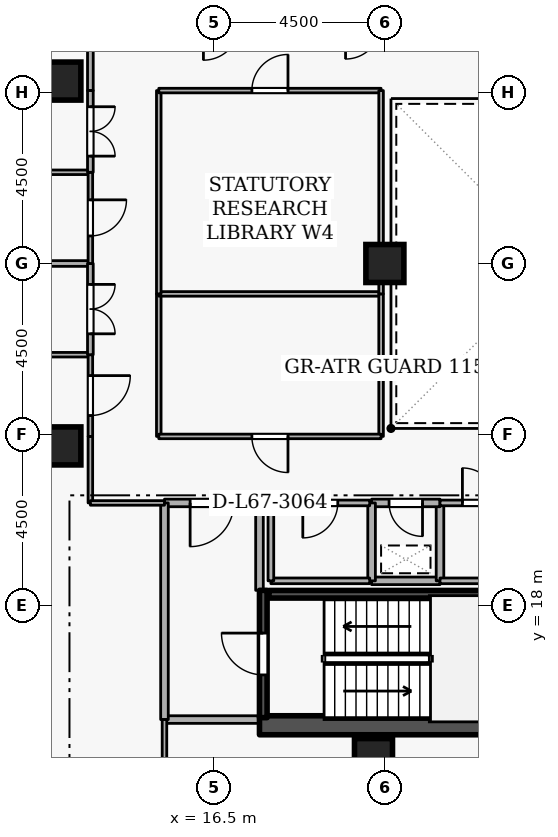
"""IFC4 building model, lengths in metres.
Left out: names, types, materials, properties, quantities, classifications, styles, units other than length and angle.
Written with IfcOpenShell. Run it as: python <this file> out.ifc"""

import sys

from ifc_helpers import new_model, si_unit, direction, frame, frame_2d, origin, origin_2d, place, context, subcontext, project, spatial, rectangle, extrude, element, fill, save


model = new_model("IFC4")
c1 = context("Model", 3, precision=1e-05, world=origin(), true_north=direction((0.0, 1.0)))
c2 = subcontext(c1, "Body", "Model", "MODEL_VIEW")
j1 = project(units=[si_unit("LENGTHUNIT", "METRE"), si_unit("PLANEANGLEUNIT", "RADIAN")], contexts=[c1])
p1 = place(None, origin())
s1 = spatial("IfcSite", under=j1, at=p1, CompositionType="ELEMENT")
p2 = place(p1, origin())
s2 = spatial("IfcBuilding", under=s1, at=p2, CompositionType="ELEMENT")
p3 = place(p2, frame((0.0, 0.0, 251.1)))
s3 = spatial("IfcBuildingStorey", under=s2, at=p3, CompositionType="ELEMENT", Elevation=251.1)
p4 = place(p3, frame((17.7, 14.85, 0.0), z_axis=(0.0, 0.0, 1.0), x_axis=(1.0, 0.0, 0.0)))
e1 = element("IfcWall", 1, at=p4, inside=s3, PredefinedType="SHEAR", context=c2, shape_type="SweptSolid", body=[
    extrude(rectangle(XDim=15.6, YDim=0.5, at=frame_2d((7.8, 0.0))), origin(), (0.0, 0.0, 1.0), 3.6),
])
for number, where, z_axis, x_axis in (
    (2, (12.5, 22.2, 0.0), (0.0, 0.0, 1.0), (1.0, 0.0, 0.0)),
    (3, (12.5, 31.8, 0.0), (0.0, 0.0, 1.0), (1.0, 0.0, 0.0)),
    (4, (20.7, 14.0, 0.0), (0.0, 0.0, 1.0), (1.0, 0.0, 0.0)),
    (5, (21.0, 27.0, 0.0), (0.0, 0.0, 1.0), (1.0, 0.0, 0.0)),
):
    element("IfcColumn", number, at=place(p3, frame(where, z_axis=z_axis, x_axis=x_axis)), inside=s3, PredefinedType="COLUMN", context=c2, shape_type="SweptSolid", body=[
        extrude(rectangle(XDim=1.0, YDim=1.0, at=origin_2d()), origin(), (0.0, 0.0, 1.0), 3.6),
    ])
p5 = place(p3, frame((17.8, 15.05, 0.0), z_axis=(0.0, 0.0, 1.0), x_axis=(0.0, 1.0, 0.0)))
e6 = element("IfcWall", 6, at=p5, inside=s3, PredefinedType="SHEAR", context=c2, shape_type="SweptSolid", body=[
    extrude(rectangle(XDim=3.35, YDim=0.2, at=frame_2d((1.675, 0.0))), origin(), (0.0, 0.0, 1.0), 3.6),
])
p6 = place(p5, frame((1.125, 0.0, 0.0)))
e7 = element("IfcOpeningElement", 7, at=p6, cuts=e6, PredefinedType="OPENING", context=c2, shape_type="SweptSolid", body=[
    extrude(rectangle(XDim=1.1, YDim=2.1, at=frame_2d((0.55, 1.05))), frame((0.0, 0.11, 0.0), z_axis=(0.0, -1.0, 0.0), x_axis=(1.0, 0.0, 0.0)), (0.0, 0.0, 1.0), 0.22),
])
p7 = place(p3, frame((25.05, 18.297, 0.0), z_axis=(0.0, 0.0, 1.0), x_axis=(-1.0, 0.0, 0.0)))
e8 = element("IfcWall", 8, at=p7, inside=s3, PredefinedType="SHEAR", context=c2, shape_type="SweptSolid", body=[
    extrude(rectangle(XDim=7.1, YDim=0.2, at=frame_2d((3.55, 0.0))), origin(), (0.0, 0.0, 1.0), 3.6),
])
p8 = place(p3, frame((15.2, 15.0, 0.0), z_axis=(0.0, 0.0, 1.0), x_axis=(1.0, 0.0, 0.0)))
e9 = element("IfcWall", 9, at=p8, inside=s3, PredefinedType="STANDARD", context=c2, shape_type="SweptSolid", body=[
    extrude(rectangle(XDim=2.5, YDim=0.2, at=frame_2d((1.25, 0.0))), origin(), (0.0, 0.0, 1.0), 3.32),
])
p9 = place(p3, frame((17.7, 18.4, 0.0), z_axis=(0.0, 0.0, 1.0), x_axis=(0.0, 1.0, 0.0)))
e10 = element("IfcWall", 10, at=p9, inside=s3, PredefinedType="STANDARD", context=c2, shape_type="SweptSolid", body=[
    extrude(rectangle(XDim=2.3, YDim=0.2, at=frame_2d((1.15, 0.0))), origin(), (0.0, 0.0, 1.0), 2.525),
])
p10 = place(p3, frame((17.7, 20.7, 0.0), z_axis=(0.0, 0.0, 1.0), x_axis=(-1.0, 0.0, 0.0)))
e11 = element("IfcWall", 11, at=p10, inside=s3, PredefinedType="STANDARD", context=c2, shape_type="SweptSolid", body=[
    extrude(rectangle(XDim=2.5, YDim=0.2, at=frame_2d((1.25, 0.0))), origin(), (0.0, 0.0, 1.0), 3.32),
])
p11 = place(p10, frame((0.675, 0.0, 0.0)))
e12 = element("IfcOpeningElement", 12, at=p11, cuts=e11, PredefinedType="OPENING", context=c2, shape_type="SweptSolid", body=[
    extrude(rectangle(XDim=1.15, YDim=2.1, at=frame_2d((0.575, 1.05))), frame((0.0, 0.11, 0.0), z_axis=(0.0, -1.0, 0.0), x_axis=(1.0, 0.0, 0.0)), (0.0, 0.0, 1.0), 0.22),
])
p12 = place(p3, frame((15.2, 20.7, 0.0), z_axis=(0.0, 0.0, 1.0), x_axis=(0.0, -1.0, 0.0)))
e13 = element("IfcWall", 13, at=p12, inside=s3, PredefinedType="STANDARD", context=c2, shape_type="SweptSolid", body=[
    extrude(rectangle(XDim=5.7, YDim=0.2, at=frame_2d((2.85, 0.0))), origin(), (0.0, 0.0, 1.0), 3.32),
])
p13 = place(p3, frame((20.65, 18.65, 0.0), z_axis=(0.0, 0.0, 1.0), x_axis=(1.0, 0.0, 0.0)))
e14 = element("IfcWall", 14, at=p13, inside=s3, PredefinedType="STANDARD", context=c2, shape_type="SweptSolid", body=[
    extrude(rectangle(XDim=1.8, YDim=0.2, at=frame_2d((0.9, 0.0))), origin(), (0.0, 0.0, 1.0), 3.32),
])
p14 = place(p3, frame((22.45, 18.65, 0.0), z_axis=(0.0, 0.0, 1.0), x_axis=(0.0, 1.0, 0.0)))
e15 = element("IfcWall", 15, at=p14, inside=s3, PredefinedType="STANDARD", context=c2, shape_type="SweptSolid", body=[
    extrude(rectangle(XDim=2.05, YDim=0.2, at=frame_2d((1.025, 0.0))), origin(), (0.0, 0.0, 1.0), 3.32),
])
p15 = place(p3, frame((22.45, 20.7, 0.0), z_axis=(0.0, 0.0, 1.0), x_axis=(-1.0, 0.0, 0.0)))
e16 = element("IfcWall", 16, at=p15, inside=s3, PredefinedType="STANDARD", context=c2, shape_type="SweptSolid", body=[
    extrude(rectangle(XDim=1.8, YDim=0.2, at=frame_2d((0.9, 0.0))), origin(), (0.0, 0.0, 1.0), 3.32),
])
p16 = place(p15, frame((0.46, 0.0, 0.0)))
e17 = element("IfcOpeningElement", 17, at=p16, cuts=e16, PredefinedType="OPENING", context=c2, shape_type="SweptSolid", body=[
    extrude(rectangle(XDim=0.88, YDim=2.04, at=frame_2d((0.44, 1.02))), frame((0.0, 0.11, 0.0), z_axis=(0.0, -1.0, 0.0), x_axis=(1.0, 0.0, 0.0)), (0.0, 0.0, 1.0), 0.22),
])
p17 = place(p3, frame((20.65, 20.7, 0.0), z_axis=(0.0, 0.0, 1.0), x_axis=(0.0, -1.0, 0.0)))
e18 = element("IfcWall", 18, at=p17, inside=s3, PredefinedType="STANDARD", context=c2, shape_type="SweptSolid", body=[
    extrude(rectangle(XDim=2.05, YDim=0.2, at=frame_2d((1.025, 0.0))), origin(), (0.0, 0.0, 1.0), 3.32),
])
p18 = place(p3, frame((18.0, 18.65, 0.0), z_axis=(0.0, 0.0, 1.0), x_axis=(1.0, 0.0, 0.0)))
e19 = element("IfcWall", 19, at=p18, inside=s3, PredefinedType="PARTITIONING", context=c2, shape_type="SweptSolid", body=[
    extrude(rectangle(XDim=2.6, YDim=0.15, at=frame_2d((1.3, 0.0))), origin(), (0.0, 0.0, 1.0), 3.32),
])
p19 = place(p3, frame((20.6, 20.7, 0.0), z_axis=(0.0, 0.0, 1.0), x_axis=(-1.0, 0.0, 0.0)))
e20 = element("IfcWall", 20, at=p19, inside=s3, PredefinedType="PARTITIONING", context=c2, shape_type="SweptSolid", body=[
    extrude(rectangle(XDim=2.6, YDim=0.15, at=frame_2d((1.3, 0.0))), origin(), (0.0, 0.0, 1.0), 3.32),
])
p20 = place(p19, frame((0.84, 0.0, 0.0)))
e21 = element("IfcOpeningElement", 21, at=p20, cuts=e20, PredefinedType="OPENING", context=c2, shape_type="SweptSolid", body=[
    extrude(rectangle(XDim=0.92, YDim=2.08, at=frame_2d((0.46, 1.04))), frame((0.0, 0.085, 0.0), z_axis=(0.0, -1.0, 0.0), x_axis=(1.0, 0.0, 0.0)), (0.0, 0.0, 1.0), 0.17),
])
p21 = place(p3, frame((18.0, 20.7, 0.0), z_axis=(0.0, 0.0, 1.0), x_axis=(0.0, -1.0, 0.0)))
e22 = element("IfcWall", 22, at=p21, inside=s3, PredefinedType="PARTITIONING", context=c2, shape_type="SweptSolid", body=[
    extrude(rectangle(XDim=2.05, YDim=0.15, at=frame_2d((1.025, 0.0))), origin(), (0.0, 0.0, 1.0), 2.525),
])
p22 = place(p3, frame((24.55, 18.65, 0.0), z_axis=(0.0, 0.0, 1.0), x_axis=(-1.0, 0.0, 0.0)))
e23 = element("IfcWall", 23, at=p22, inside=s3, PredefinedType="PARTITIONING", context=c2, shape_type="SweptSolid", body=[
    extrude(rectangle(XDim=2.1, YDim=0.15, at=frame_2d((1.05, 0.0))), origin(), (0.0, 0.0, 1.0), 3.32),
])
p23 = place(p3, frame((22.45, 20.7, 0.0), z_axis=(0.0, 0.0, 1.0), x_axis=(1.0, 0.0, 0.0)))
e24 = element("IfcWall", 24, at=p23, inside=s3, PredefinedType="PARTITIONING", context=c2, shape_type="SweptSolid", body=[
    extrude(rectangle(XDim=2.1, YDim=0.15, at=frame_2d((1.05, 0.0))), origin(), (0.0, 0.0, 1.0), 3.32),
])
p24 = place(p23, frame((0.59, 0.0, 0.0)))
e25 = element("IfcOpeningElement", 25, at=p24, cuts=e24, PredefinedType="OPENING", context=c2, shape_type="SweptSolid", body=[
    extrude(rectangle(XDim=0.92, YDim=2.08, at=frame_2d((0.46, 1.04))), frame((0.0, 0.085, 0.0), z_axis=(0.0, -1.0, 0.0), x_axis=(1.0, 0.0, 0.0)), (0.0, 0.0, 1.0), 0.17),
])
p25 = place(p3, frame((13.25, 22.45, 0.0), z_axis=(0.0, 0.0, 1.0), x_axis=(0.0, -1.0, 0.0)))
e26 = element("IfcWall", 26, at=p25, inside=s3, PredefinedType="PARTITIONING", context=c2, shape_type="SweptSolid", body=[
    extrude(rectangle(XDim=1.75, YDim=0.12, at=frame_2d((0.875, 0.0))), origin(), (0.0, 0.0, 1.0), 3.32),
])
p26 = place(p3, frame((13.25, 20.7, 0.0), z_axis=(0.0, 0.0, 1.0), x_axis=(1.0, 0.0, 0.0)))
e27 = element("IfcWall", 27, at=p26, inside=s3, PredefinedType="PARTITIONING", context=c2, shape_type="SweptSolid", body=[
    extrude(rectangle(XDim=1.95, YDim=0.12, at=frame_2d((0.975, 0.0))), origin(), (0.0, 0.0, 1.0), 3.32),
])
p27 = place(p3, frame((15.2, 15.0, 0.0), z_axis=(0.0, 0.0, 1.0), x_axis=(0.0, -1.0, 0.0)))
e28 = element("IfcWall", 28, at=p27, inside=s3, PredefinedType="PARTITIONING", context=c2, shape_type="SweptSolid", body=[
    extrude(rectangle(XDim=11.72, YDim=0.12, at=frame_2d((5.86, 0.0))), origin(), (0.0, 0.0, 1.0), 3.32),
])
p28 = place(p3, frame((1.78, 24.6, 0.0), z_axis=(0.0, 0.0, 1.0), x_axis=(1.0, 0.0, 0.0)))
e29 = element("IfcWall", 29, at=p28, inside=s3, PredefinedType="PARTITIONING", context=c2, shape_type="SweptSolid", body=[
    extrude(rectangle(XDim=11.47, YDim=0.12, at=frame_2d((5.735, 0.0))), origin(), (0.0, 0.0, 1.0), 3.32),
])
p29 = place(p3, frame((13.25, 24.6, 0.0), z_axis=(0.0, 0.0, 1.0), x_axis=(0.0, -1.0, 0.0)))
e30 = element("IfcWall", 30, at=p29, inside=s3, PredefinedType="PARTITIONING", context=c2, shape_type="SweptSolid", body=[
    extrude(rectangle(XDim=2.15, YDim=0.12, at=frame_2d((1.075, 0.0))), origin(), (0.0, 0.0, 1.0), 3.32),
])
p30 = place(p29, frame((0.55, 0.0, 0.0)))
e31 = element("IfcOpeningElement", 31, at=p30, cuts=e30, PredefinedType="OPENING", context=c2, shape_type="SweptSolid", body=[
    extrude(rectangle(XDim=1.05, YDim=2.1, at=frame_2d((0.525, 1.05))), frame((0.0, 0.07, 0.0), z_axis=(0.0, -1.0, 0.0), x_axis=(1.0, 0.0, 0.0)), (0.0, 0.0, 1.0), 0.14),
])
p31 = place(p3, frame((1.78, 27.0, 0.0), z_axis=(0.0, 0.0, 1.0), x_axis=(1.0, 0.0, 0.0)))
e32 = element("IfcWall", 32, at=p31, inside=s3, PredefinedType="PARTITIONING", context=c2, shape_type="SweptSolid", body=[
    extrude(rectangle(XDim=11.47, YDim=0.15, at=frame_2d((5.735, 0.0))), origin(), (0.0, 0.0, 1.0), 2.862),
])
p32 = place(p3, frame((13.25, 27.0, 0.0), z_axis=(0.0, 0.0, 1.0), x_axis=(0.0, -1.0, 0.0)))
e33 = element("IfcWall", 33, at=p32, inside=s3, PredefinedType="PARTITIONING", context=c2, shape_type="SweptSolid", body=[
    extrude(rectangle(XDim=2.4, YDim=0.15, at=frame_2d((1.2, 0.0))), origin(), (0.0, 0.0, 1.0), 3.32),
])
p33 = place(p32, frame((0.55, 0.0, 0.0)))
e34 = element("IfcOpeningElement", 34, at=p33, cuts=e33, PredefinedType="OPENING", context=c2, shape_type="SweptSolid", body=[
    extrude(rectangle(XDim=1.3, YDim=2.12, at=frame_2d((0.65, 1.06))), frame((0.0, 0.085, 0.0), z_axis=(0.0, -1.0, 0.0), x_axis=(1.0, 0.0, 0.0)), (0.0, 0.0, 1.0), 0.17),
])
p34 = place(p3, frame((1.78, 29.4, 0.0), z_axis=(0.0, 0.0, 1.0), x_axis=(1.0, 0.0, 0.0)))
e35 = element("IfcWall", 35, at=p34, inside=s3, PredefinedType="PARTITIONING", context=c2, shape_type="SweptSolid", body=[
    extrude(rectangle(XDim=11.47, YDim=0.12, at=frame_2d((5.735, 0.0))), origin(), (0.0, 0.0, 1.0), 3.32),
])
p35 = place(p3, frame((13.25, 29.4, 0.0), z_axis=(0.0, 0.0, 1.0), x_axis=(0.0, -1.0, 0.0)))
e36 = element("IfcWall", 36, at=p35, inside=s3, PredefinedType="PARTITIONING", context=c2, shape_type="SweptSolid", body=[
    extrude(rectangle(XDim=2.4, YDim=0.12, at=frame_2d((1.2, 0.0))), origin(), (0.0, 0.0, 1.0), 3.32),
])
p36 = place(p35, frame((0.725, 0.0, 0.0)))
e37 = element("IfcOpeningElement", 37, at=p36, cuts=e36, PredefinedType="OPENING", context=c2, shape_type="SweptSolid", body=[
    extrude(rectangle(XDim=0.95, YDim=2.1, at=frame_2d((0.475, 1.05))), frame((0.0, 0.07, 0.0), z_axis=(0.0, -1.0, 0.0), x_axis=(1.0, 0.0, 0.0)), (0.0, 0.0, 1.0), 0.14),
])
p37 = place(p3, frame((13.25, 33.3, 0.0), z_axis=(0.0, 0.0, 1.0), x_axis=(0.0, -1.0, 0.0)))
e38 = element("IfcWall", 38, at=p37, inside=s3, PredefinedType="PARTITIONING", context=c2, shape_type="SweptSolid", body=[
    extrude(rectangle(XDim=1.75, YDim=0.15, at=frame_2d((0.875, 0.0))), origin(), (0.0, 0.0, 1.0), 3.32),
])
p38 = place(p3, frame((13.25, 31.55, 0.0), z_axis=(0.0, 0.0, 1.0), x_axis=(0.0, -1.0, 0.0)))
e39 = element("IfcWall", 39, at=p38, inside=s3, PredefinedType="PARTITIONING", context=c2, shape_type="SweptSolid", body=[
    extrude(rectangle(XDim=2.15, YDim=0.15, at=frame_2d((1.075, 0.0))), origin(), (0.0, 0.0, 1.0), 3.32),
])
p39 = place(p38, frame((0.425, 0.0, 0.0)))
e40 = element("IfcOpeningElement", 40, at=p39, cuts=e39, PredefinedType="OPENING", context=c2, shape_type="SweptSolid", body=[
    extrude(rectangle(XDim=1.3, YDim=2.12, at=frame_2d((0.65, 1.06))), frame((0.0, 0.085, 0.0), z_axis=(0.0, -1.0, 0.0), x_axis=(1.0, 0.0, 0.0)), (0.0, 0.0, 1.0), 0.17),
])
p40 = place(p3, frame((15.05, 22.45, 0.0), z_axis=(0.0, 0.0, 1.0), x_axis=(0.0, 1.0, 0.0)))
e41 = element("IfcWall", 41, at=p40, inside=s3, PredefinedType="PARTITIONING", context=c2, shape_type="SweptSolid", body=[
    extrude(rectangle(XDim=3.75, YDim=0.12, at=frame_2d((1.875, 0.0))), origin(), (0.0, 0.0, 1.0), 3.32),
])
p41 = place(p3, frame((15.05, 26.2, 0.0), z_axis=(0.0, 0.0, 1.0), x_axis=(1.0, 0.0, 0.0)))
e42 = element("IfcWall", 42, at=p41, inside=s3, PredefinedType="PARTITIONING", context=c2, shape_type="SweptSolid", body=[
    extrude(rectangle(XDim=5.85, YDim=0.12, at=frame_2d((2.925, 0.0))), origin(), (0.0, 0.0, 1.0), 3.32),
])
p42 = place(p3, frame((20.9, 26.2, 0.0), z_axis=(0.0, 0.0, 1.0), x_axis=(0.0, -1.0, 0.0)))
e43 = element("IfcWall", 43, at=p42, inside=s3, PredefinedType="PARTITIONING", context=c2, shape_type="SweptSolid", body=[
    extrude(rectangle(XDim=3.75, YDim=0.12, at=frame_2d((1.875, 0.0))), origin(), (0.0, 0.0, 1.0), 3.32),
])
p43 = place(p3, frame((20.9, 22.45, 0.0), z_axis=(0.0, 0.0, 1.0), x_axis=(-1.0, 0.0, 0.0)))
e44 = element("IfcWall", 44, at=p43, inside=s3, PredefinedType="PARTITIONING", context=c2, shape_type="SweptSolid", body=[
    extrude(rectangle(XDim=5.85, YDim=0.12, at=frame_2d((2.925, 0.0))), origin(), (0.0, 0.0, 1.0), 3.32),
])
p44 = place(p43, frame((2.45, 0.0, 0.0)))
e45 = element("IfcOpeningElement", 45, at=p44, cuts=e44, PredefinedType="OPENING", context=c2, shape_type="SweptSolid", body=[
    extrude(rectangle(XDim=0.95, YDim=2.1, at=frame_2d((0.475, 1.05))), frame((0.0, 0.07, 0.0), z_axis=(0.0, -1.0, 0.0), x_axis=(1.0, 0.0, 0.0)), (0.0, 0.0, 1.0), 0.14),
])
p45 = place(p3, frame((15.05, 26.2, 0.0), z_axis=(0.0, 0.0, 1.0), x_axis=(0.0, 1.0, 0.0)))
e46 = element("IfcWall", 46, at=p45, inside=s3, PredefinedType="PARTITIONING", context=c2, shape_type="SweptSolid", body=[
    extrude(rectangle(XDim=5.35, YDim=0.12, at=frame_2d((2.675, 0.0))), origin(), (0.0, 0.0, 1.0), 3.32),
])
p46 = place(p3, frame((15.05, 31.55, 0.0), z_axis=(0.0, 0.0, 1.0), x_axis=(1.0, 0.0, 0.0)))
e47 = element("IfcWall", 47, at=p46, inside=s3, PredefinedType="PARTITIONING", context=c2, shape_type="SweptSolid", body=[
    extrude(rectangle(XDim=5.85, YDim=0.12, at=frame_2d((2.925, 0.0))), origin(), (0.0, 0.0, 1.0), 3.32),
])
p47 = place(p46, frame((2.45, 0.0, 0.0)))
e48 = element("IfcOpeningElement", 48, at=p47, cuts=e47, PredefinedType="OPENING", context=c2, shape_type="SweptSolid", body=[
    extrude(rectangle(XDim=0.95, YDim=2.1, at=frame_2d((0.475, 1.05))), frame((0.0, 0.07, 0.0), z_axis=(0.0, -1.0, 0.0), x_axis=(1.0, 0.0, 0.0)), (0.0, 0.0, 1.0), 0.14),
])
p48 = place(p3, frame((20.9, 31.55, 0.0), z_axis=(0.0, 0.0, 1.0), x_axis=(0.0, -1.0, 0.0)))
e49 = element("IfcWall", 49, at=p48, inside=s3, PredefinedType="PARTITIONING", context=c2, shape_type="SweptSolid", body=[
    extrude(rectangle(XDim=5.35, YDim=0.12, at=frame_2d((2.675, 0.0))), origin(), (0.0, 0.0, 1.0), 3.32),
])
p49 = place(p6, origin())
e50 = element("IfcDoor", 50, at=p49, inside=s3, OperationType="SINGLE_SWING_RIGHT", PredefinedType="DOOR", context=c2, shape_type="SweptSolid", body=[
    extrude(rectangle(XDim=1.1, YDim=2.1, at=frame_2d((0.55, 1.05))), frame((0.0, 0.025, 0.0), z_axis=(0.0, -1.0, 0.0), x_axis=(1.0, 0.0, 0.0)), (0.0, 0.0, 1.0), 0.05),
])
fill(e7, e50)
p50 = place(p11, origin())
e51 = element("IfcDoor", 51, at=p50, inside=s3, OperationType="SINGLE_SWING_RIGHT", PredefinedType="DOOR", context=c2, shape_type="SweptSolid", body=[
    extrude(rectangle(XDim=1.15, YDim=2.1, at=frame_2d((0.575, 1.05))), frame((0.0, 0.025, 0.0), z_axis=(0.0, -1.0, 0.0), x_axis=(1.0, 0.0, 0.0)), (0.0, 0.0, 1.0), 0.05),
])
fill(e12, e51)
p51 = place(p16, origin())
e52 = element("IfcDoor", 52, at=p51, inside=s3, OperationType="SINGLE_SWING_LEFT", PredefinedType="DOOR", context=c2, shape_type="SweptSolid", body=[
    extrude(rectangle(XDim=0.88, YDim=2.04, at=frame_2d((0.44, 1.02))), frame((0.0, 0.025, 0.0), z_axis=(0.0, -1.0, 0.0), x_axis=(1.0, 0.0, 0.0)), (0.0, 0.0, 1.0), 0.05),
])
fill(e17, e52)
p52 = place(p20, origin())
e53 = element("IfcDoor", 53, at=p52, inside=s3, OperationType="SINGLE_SWING_RIGHT", PredefinedType="DOOR", context=c2, shape_type="SweptSolid", body=[
    extrude(rectangle(XDim=0.92, YDim=2.08, at=frame_2d((0.46, 1.04))), frame((0.0, 0.025, 0.0), z_axis=(0.0, -1.0, 0.0), x_axis=(1.0, 0.0, 0.0)), (0.0, 0.0, 1.0), 0.05),
])
fill(e21, e53)
p53 = place(p24, origin())
e54 = element("IfcDoor", 54, at=p53, inside=s3, OperationType="SINGLE_SWING_LEFT", PredefinedType="DOOR", context=c2, shape_type="SweptSolid", body=[
    extrude(rectangle(XDim=0.92, YDim=2.08, at=frame_2d((0.46, 1.04))), frame((0.0, 0.025, 0.0), z_axis=(0.0, -1.0, 0.0), x_axis=(1.0, 0.0, 0.0)), (0.0, 0.0, 1.0), 0.05),
])
fill(e25, e54)
p54 = place(p30, origin())
e55 = element("IfcDoor", 55, at=p54, inside=s3, OperationType="SINGLE_SWING_LEFT", PredefinedType="DOOR", context=c2, shape_type="SweptSolid", body=[
    extrude(rectangle(XDim=1.05, YDim=2.1, at=frame_2d((0.525, 1.05))), frame((0.0, 0.025, 0.0), z_axis=(0.0, -1.0, 0.0), x_axis=(1.0, 0.0, 0.0)), (0.0, 0.0, 1.0), 0.05),
])
fill(e31, e55)
p55 = place(p33, origin())
e56 = element("IfcDoor", 56, at=p55, inside=s3, OperationType="DOUBLE_DOOR_SINGLE_SWING", PredefinedType="DOOR", context=c2, shape_type="SweptSolid", body=[
    extrude(rectangle(XDim=1.3, YDim=2.12, at=frame_2d((0.65, 1.06))), frame((0.0, 0.025, 0.0), z_axis=(0.0, -1.0, 0.0), x_axis=(1.0, 0.0, 0.0)), (0.0, 0.0, 1.0), 0.05),
])
fill(e34, e56)
p56 = place(p36, origin())
e57 = element("IfcDoor", 57, at=p56, inside=s3, OperationType="SINGLE_SWING_LEFT", PredefinedType="DOOR", context=c2, shape_type="SweptSolid", body=[
    extrude(rectangle(XDim=0.95, YDim=2.1, at=frame_2d((0.475, 1.05))), frame((0.0, 0.025, 0.0), z_axis=(0.0, -1.0, 0.0), x_axis=(1.0, 0.0, 0.0)), (0.0, 0.0, 1.0), 0.05),
])
fill(e37, e57)
p57 = place(p39, origin())
e58 = element("IfcDoor", 58, at=p57, inside=s3, OperationType="DOUBLE_DOOR_SINGLE_SWING", PredefinedType="DOOR", context=c2, shape_type="SweptSolid", body=[
    extrude(rectangle(XDim=1.3, YDim=2.12, at=frame_2d((0.65, 1.06))), frame((0.0, 0.025, 0.0), z_axis=(0.0, -1.0, 0.0), x_axis=(1.0, 0.0, 0.0)), (0.0, 0.0, 1.0), 0.05),
])
fill(e40, e58)
p58 = place(p44, origin())
e59 = element("IfcDoor", 59, at=p58, inside=s3, OperationType="SINGLE_SWING_LEFT", PredefinedType="DOOR", context=c2, shape_type="SweptSolid", body=[
    extrude(rectangle(XDim=0.95, YDim=2.1, at=frame_2d((0.475, 1.05))), frame((0.0, 0.025, 0.0), z_axis=(0.0, -1.0, 0.0), x_axis=(1.0, 0.0, 0.0)), (0.0, 0.0, 1.0), 0.05),
])
fill(e45, e59)
p59 = place(p47, origin())
e60 = element("IfcDoor", 60, at=p59, inside=s3, OperationType="SINGLE_SWING_RIGHT", PredefinedType="DOOR", context=c2, shape_type="SweptSolid", body=[
    extrude(rectangle(XDim=0.95, YDim=2.1, at=frame_2d((0.475, 1.05))), frame((0.0, 0.025, 0.0), z_axis=(0.0, -1.0, 0.0), x_axis=(1.0, 0.0, 0.0)), (0.0, 0.0, 1.0), 0.05),
])
fill(e48, e60)
save(model, sys.argv[1])
